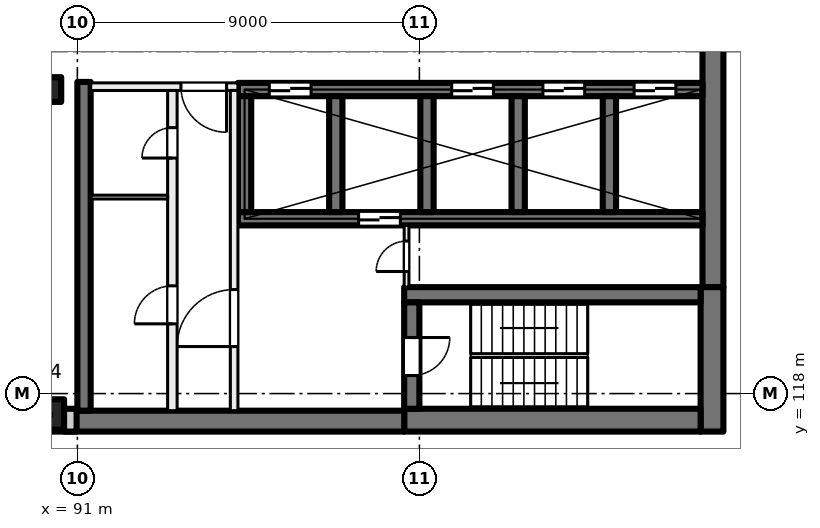
"""IFC4 building model, lengths in metres.
Left out: names, types, materials, properties, quantities, classifications, styles, units other than length and angle.
Written with IfcOpenShell. Run it as: python <this file> out.ifc"""

import sys

from ifc_helpers import new_model, si_unit, direction, frame, frame_2d, origin, origin_2d, place, context, subcontext, project, spatial, rectangle, extrude, element, fill, save


model = new_model("IFC4")
c1 = context("Model", 3, precision=1e-05, world=origin(), true_north=direction((0.0, 1.0)))
c2 = subcontext(c1, "Body", "Model", "MODEL_VIEW")
j1 = project(units=[si_unit("LENGTHUNIT", "METRE"), si_unit("PLANEANGLEUNIT", "RADIAN")], contexts=[c1])
p1 = place(None, origin())
s1 = spatial("IfcSite", under=j1, at=p1, CompositionType="ELEMENT")
p2 = place(p1, origin())
s2 = spatial("IfcBuilding", under=s1, at=p2, CompositionType="ELEMENT")
p3 = place(p2, frame((0.0, 0.0, 146.5)))
s3 = spatial("IfcBuildingStorey", under=s2, at=p3, CompositionType="ELEMENT", Elevation=146.5)
p4 = place(p3, frame((90.25, 126.0, 0.0), z_axis=(0.0, 0.0, 1.0), x_axis=(1.0, 0.0, 0.0)))
e1 = element("IfcColumn", 1, at=p4, inside=s3, PredefinedType="COLUMN", context=c2, shape_type="SweptSolid", body=[
    extrude(rectangle(XDim=0.65, YDim=0.65, at=origin_2d()), origin(), (0.0, 0.0, 1.0), 4.0),
])
p5 = place(p3, frame((90.25, 117.45, 0.0), z_axis=(0.0, 0.0, 1.0), x_axis=(1.0, 0.0, 0.0)))
e2 = element("IfcColumn", 2, at=p5, inside=s3, PredefinedType="COLUMN", context=c2, shape_type="SweptSolid", body=[
    extrude(rectangle(XDim=0.8, YDim=0.8, at=origin_2d()), origin(), (0.0, 0.0, 1.0), 4.0),
])
p6 = place(p3, frame((107.725, 135.2, 0.0), z_axis=(0.0, 0.0, 1.0), x_axis=(0.0, -1.0, 0.0)))
e3 = element("IfcWall", 3, at=p6, inside=s3, PredefinedType="SHEAR", context=c2, shape_type="SweptSolid", body=[
    extrude(rectangle(XDim=14.4, YDim=0.55, at=frame_2d((7.2, 0.0))), origin(), (0.0, 0.0, 1.0), 4.0),
])
p7 = place(p3, frame((107.7, 120.8, 0.0), z_axis=(0.0, 0.0, 1.0), x_axis=(0.0, -1.0, 0.0)))
e4 = element("IfcWall", 4, at=p7, inside=s3, PredefinedType="SHEAR", context=c2, shape_type="SweptSolid", body=[
    extrude(rectangle(XDim=3.8, YDim=0.6, at=frame_2d((1.9, 0.0))), origin(), (0.0, 0.0, 1.0), 4.0),
])
p8 = place(p3, frame((107.4, 117.3, 0.0), z_axis=(0.0, 0.0, 1.0), x_axis=(-1.0, 0.0, 0.0)))
e5 = element("IfcWall", 5, at=p8, inside=s3, PredefinedType="SHEAR", context=c2, shape_type="SweptSolid", body=[
    extrude(rectangle(XDim=7.8, YDim=0.6, at=frame_2d((3.9, 0.0))), origin(), (0.0, 0.0, 1.0), 4.0),
])
p9 = place(p3, frame((99.6, 117.275, 0.0), z_axis=(0.0, 0.0, 1.0), x_axis=(-1.0, 0.0, 0.0)))
e6 = element("IfcWall", 6, at=p9, inside=s3, PredefinedType="SHEAR", context=c2, shape_type="SweptSolid", body=[
    extrude(rectangle(XDim=8.95, YDim=0.55, at=frame_2d((4.475, 0.0))), origin(), (0.0, 0.0, 1.0), 4.0),
])
p10 = place(p3, frame((107.4, 120.6, 0.0), z_axis=(0.0, 0.0, 1.0), x_axis=(-1.0, 0.0, 0.0)))
e7 = element("IfcWall", 7, at=p10, inside=s3, PredefinedType="SHEAR", context=c2, shape_type="SweptSolid", body=[
    extrude(rectangle(XDim=7.8, YDim=0.4, at=frame_2d((3.9, 0.0))), origin(), (0.0, 0.0, 1.0), 4.0),
])
p11 = place(p3, frame((99.8, 120.4, 0.0), z_axis=(0.0, 0.0, 1.0), x_axis=(0.0, -1.0, 0.0)))
e8 = element("IfcWall", 8, at=p11, inside=s3, PredefinedType="SHEAR", context=c2, shape_type="SweptSolid", body=[
    extrude(rectangle(XDim=2.8, YDim=0.4, at=frame_2d((1.4, 0.0))), origin(), (0.0, 0.0, 1.0), 4.0),
])
p12 = place(p11, frame((0.925, 0.0, 0.0)))
e9 = element("IfcOpeningElement", 9, at=p12, cuts=e8, PredefinedType="OPENING", context=c2, shape_type="SweptSolid", body=[
    extrude(rectangle(XDim=1.0, YDim=2.1, at=frame_2d((0.5, 1.05))), frame((0.0, 0.21, 0.0), z_axis=(0.0, -1.0, 0.0), x_axis=(1.0, 0.0, 0.0)), (0.0, 0.0, 1.0), 0.42),
])
p13 = place(p3, frame((107.45, 126.0, 0.0), z_axis=(0.0, 0.0, 1.0), x_axis=(-1.0, 0.0, 0.0)))
e10 = element("IfcWall", 10, at=p13, inside=s3, PredefinedType="SHEAR", context=c2, shape_type="SweptSolid", body=[
    extrude(rectangle(XDim=12.225, YDim=0.35, at=frame_2d((6.112, 0.0))), origin(), (0.0, 0.0, 1.0), 4.0),
])
p14 = place(p13, frame((0.7, 0.0, 0.0)))
e11 = element("IfcOpeningElement", 11, at=p14, cuts=e10, PredefinedType="OPENING", context=c2, shape_type="SweptSolid", body=[
    extrude(rectangle(XDim=1.1, YDim=2.1, at=frame_2d((0.55, 1.05))), frame((0.0, 0.185, 0.0), z_axis=(0.0, -1.0, 0.0), x_axis=(1.0, 0.0, 0.0)), (0.0, 0.0, 1.0), 0.37),
])
p15 = place(p13, frame((3.1, 0.0, 0.0)))
e12 = element("IfcOpeningElement", 12, at=p15, cuts=e10, PredefinedType="OPENING", context=c2, shape_type="SweptSolid", body=[
    extrude(rectangle(XDim=1.1, YDim=2.1, at=frame_2d((0.55, 1.05))), frame((0.0, 0.185, 0.0), z_axis=(0.0, -1.0, 0.0), x_axis=(1.0, 0.0, 0.0)), (0.0, 0.0, 1.0), 0.37),
])
p16 = place(p13, frame((5.5, 0.0, 0.0)))
e13 = element("IfcOpeningElement", 13, at=p16, cuts=e10, PredefinedType="OPENING", context=c2, shape_type="SweptSolid", body=[
    extrude(rectangle(XDim=1.1, YDim=2.1, at=frame_2d((0.55, 1.05))), frame((0.0, 0.185, 0.0), z_axis=(0.0, -1.0, 0.0), x_axis=(1.0, 0.0, 0.0)), (0.0, 0.0, 1.0), 0.37),
])
p17 = place(p13, frame((10.3, 0.0, 0.0)))
e14 = element("IfcOpeningElement", 14, at=p17, cuts=e10, PredefinedType="OPENING", context=c2, shape_type="SweptSolid", body=[
    extrude(rectangle(XDim=1.1, YDim=2.1, at=frame_2d((0.55, 1.05))), frame((0.0, 0.185, 0.0), z_axis=(0.0, -1.0, 0.0), x_axis=(1.0, 0.0, 0.0)), (0.0, 0.0, 1.0), 0.37),
])
p18 = place(p3, frame((107.45, 122.6, 0.0), z_axis=(0.0, 0.0, 1.0), x_axis=(-1.0, 0.0, 0.0)))
e15 = element("IfcWall", 15, at=p18, inside=s3, PredefinedType="SHEAR", context=c2, shape_type="SweptSolid", body=[
    extrude(rectangle(XDim=12.225, YDim=0.35, at=frame_2d((6.112, 0.0))), origin(), (0.0, 0.0, 1.0), 4.0),
])
p19 = place(p18, frame((7.95, 0.0, 0.0)))
e16 = element("IfcOpeningElement", 16, at=p19, cuts=e15, PredefinedType="OPENING", context=c2, shape_type="SweptSolid", body=[
    extrude(rectangle(XDim=1.1, YDim=2.1, at=frame_2d((0.55, 1.05))), frame((0.0, 0.185, 0.0), z_axis=(0.0, -1.0, 0.0), x_axis=(1.0, 0.0, 0.0)), (0.0, 0.0, 1.0), 0.37),
])
for number, where, z_axis, x_axis in (
    (17, (105.0, 125.825, 0.0), (0.0, 0.0, 1.0), (0.0, -1.0, 0.0)),
    (18, (102.6, 125.825, 0.0), (0.0, 0.0, 1.0), (0.0, -1.0, 0.0)),
    (19, (100.2, 125.825, 0.0), (0.0, 0.0, 1.0), (0.0, -1.0, 0.0)),
    (20, (97.8, 125.825, 0.0), (0.0, 0.0, 1.0), (0.0, -1.0, 0.0)),
    (21, (95.4, 125.825, 0.0), (0.0, 0.0, 1.0), (0.0, -1.0, 0.0)),
):
    element("IfcWall", number, at=place(p3, frame(where, z_axis=z_axis, x_axis=x_axis)), inside=s3, PredefinedType="SHEAR", context=c2, shape_type="SweptSolid", body=[
        extrude(rectangle(XDim=3.05, YDim=0.35, at=frame_2d((1.525, 0.0))), origin(), (0.0, 0.0, 1.0), 4.0),
    ])
p20 = place(p3, frame((91.175, 126.2, 0.0), z_axis=(0.0, 0.0, 1.0), x_axis=(0.0, -1.0, 0.0)))
e22 = element("IfcWall", 22, at=p20, inside=s3, PredefinedType="SHEAR", context=c2, shape_type="SweptSolid", body=[
    extrude(rectangle(XDim=8.65, YDim=0.35, at=frame_2d((4.325, 0.0))), origin(), (0.0, 0.0, 1.0), 4.0),
])
p21 = place(p3, frame((90.98, 117.3, 0.0), z_axis=(0.0, 0.0, 1.0), x_axis=(-1.0, 0.0, 0.0)))
e23 = element("IfcWall", 23, at=p21, inside=s3, PredefinedType="SOLIDWALL", context=c2, shape_type="SweptSolid", body=[
    extrude(rectangle(XDim=33.745, YDim=0.6, at=frame_2d((16.873, 0.0))), origin(), (0.0, 0.0, 1.0), 3.625),
])
p22 = place(p21, frame((1.48, 0.0, 0.9)))
e24 = element("IfcOpeningElement", 24, at=p22, cuts=e23, PredefinedType="OPENING", context=c2, shape_type="SweptSolid", body=[
    extrude(rectangle(XDim=3.0, YDim=2.4, at=frame_2d((1.5, 1.2))), frame((0.0, 0.31, 0.0), z_axis=(0.0, -1.0, 0.0), x_axis=(1.0, 0.0, 0.0)), (0.0, 0.0, 1.0), 0.62),
])
p23 = place(p21, frame((5.98, 0.0, 0.9)))
e25 = element("IfcOpeningElement", 25, at=p23, cuts=e23, PredefinedType="OPENING", context=c2, shape_type="SweptSolid", body=[
    extrude(rectangle(XDim=3.0, YDim=2.4, at=frame_2d((1.5, 1.2))), frame((0.0, 0.31, 0.0), z_axis=(0.0, -1.0, 0.0), x_axis=(1.0, 0.0, 0.0)), (0.0, 0.0, 1.0), 0.62),
])
p24 = place(p21, frame((10.48, 0.0, 0.9)))
e26 = element("IfcOpeningElement", 26, at=p24, cuts=e23, PredefinedType="OPENING", context=c2, shape_type="SweptSolid", body=[
    extrude(rectangle(XDim=3.0, YDim=2.4, at=frame_2d((1.5, 1.2))), frame((0.0, 0.31, 0.0), z_axis=(0.0, -1.0, 0.0), x_axis=(1.0, 0.0, 0.0)), (0.0, 0.0, 1.0), 0.62),
])
p25 = place(p21, frame((14.98, 0.0, 0.9)))
e27 = element("IfcOpeningElement", 27, at=p25, cuts=e23, PredefinedType="OPENING", context=c2, shape_type="SweptSolid", body=[
    extrude(rectangle(XDim=3.0, YDim=2.4, at=frame_2d((1.5, 1.2))), frame((0.0, 0.31, 0.0), z_axis=(0.0, -1.0, 0.0), x_axis=(1.0, 0.0, 0.0)), (0.0, 0.0, 1.0), 0.62),
])
p26 = place(p21, frame((19.48, 0.0, 0.9)))
e28 = element("IfcOpeningElement", 28, at=p26, cuts=e23, PredefinedType="OPENING", context=c2, shape_type="SweptSolid", body=[
    extrude(rectangle(XDim=3.0, YDim=2.4, at=frame_2d((1.5, 1.2))), frame((0.0, 0.31, 0.0), z_axis=(0.0, -1.0, 0.0), x_axis=(1.0, 0.0, 0.0)), (0.0, 0.0, 1.0), 0.62),
])
p27 = place(p21, frame((23.98, 0.0, 0.9)))
e29 = element("IfcOpeningElement", 29, at=p27, cuts=e23, PredefinedType="OPENING", context=c2, shape_type="SweptSolid", body=[
    extrude(rectangle(XDim=3.0, YDim=2.4, at=frame_2d((1.5, 1.2))), frame((0.0, 0.31, 0.0), z_axis=(0.0, -1.0, 0.0), x_axis=(1.0, 0.0, 0.0)), (0.0, 0.0, 1.0), 0.62),
])
p28 = place(p21, frame((28.48, 0.0, 0.9)))
e30 = element("IfcOpeningElement", 30, at=p28, cuts=e23, PredefinedType="OPENING", context=c2, shape_type="SweptSolid", body=[
    extrude(rectangle(XDim=3.0, YDim=2.4, at=frame_2d((1.5, 1.2))), frame((0.0, 0.31, 0.0), z_axis=(0.0, -1.0, 0.0), x_axis=(1.0, 0.0, 0.0)), (0.0, 0.0, 1.0), 0.62),
])
p29 = place(p3, frame((95.225, 126.075, 0.0), z_axis=(0.0, 0.0, 1.0), x_axis=(-1.0, 0.0, 0.0)))
e31 = element("IfcWall", 31, at=p29, inside=s3, PredefinedType="PARTITIONING", context=c2, shape_type="SweptSolid", body=[
    extrude(rectangle(XDim=3.875, YDim=0.2, at=frame_2d((1.938, 0.0))), origin(), (0.0, 0.0, 1.0), 3.625),
])
p30 = place(p29, frame((0.3, 0.0, 0.0)))
e32 = element("IfcOpeningElement", 32, at=p30, cuts=e31, PredefinedType="OPENING", context=c2, shape_type="SweptSolid", body=[
    extrude(rectangle(XDim=1.2, YDim=2.1, at=frame_2d((0.6, 1.05))), frame((0.0, 0.11, 0.0), z_axis=(0.0, -1.0, 0.0), x_axis=(1.0, 0.0, 0.0)), (0.0, 0.0, 1.0), 0.22),
])
p31 = place(p3, frame((95.125, 117.55, 0.0), z_axis=(0.0, 0.0, 1.0), x_axis=(0.0, 1.0, 0.0)))
e33 = element("IfcWall", 33, at=p31, inside=s3, PredefinedType="PARTITIONING", context=c2, shape_type="SweptSolid", body=[
    extrude(rectangle(XDim=8.425, YDim=0.2, at=frame_2d((4.212, 0.0))), origin(), (0.0, 0.0, 1.0), 3.625),
])
p32 = place(p31, frame((1.688, 0.0, 0.0)))
e34 = element("IfcOpeningElement", 34, at=p32, cuts=e33, PredefinedType="OPENING", context=c2, shape_type="SweptSolid", body=[
    extrude(rectangle(XDim=1.5, YDim=2.1, at=frame_2d((0.75, 1.05))), frame((0.0, 0.11, 0.0), z_axis=(0.0, -1.0, 0.0), x_axis=(1.0, 0.0, 0.0)), (0.0, 0.0, 1.0), 0.22),
])
p33 = place(p3, frame((93.5, 117.55, 0.0), z_axis=(0.0, 0.0, 1.0), x_axis=(0.0, 1.0, 0.0)))
e35 = element("IfcWall", 35, at=p33, inside=s3, PredefinedType="PARTITIONING", context=c2, shape_type="SweptSolid", body=[
    extrude(rectangle(XDim=8.425, YDim=0.25, at=frame_2d((4.212, 0.0))), origin(), (0.0, 0.0, 1.0), 3.625),
])
p34 = place(p33, frame((6.647, 0.0, 0.0)))
e36 = element("IfcOpeningElement", 36, at=p34, cuts=e35, PredefinedType="OPENING", context=c2, shape_type="SweptSolid", body=[
    extrude(rectangle(XDim=0.8, YDim=2.1, at=frame_2d((0.4, 1.05))), frame((0.0, 0.135, 0.0), z_axis=(0.0, -1.0, 0.0), x_axis=(1.0, 0.0, 0.0)), (0.0, 0.0, 1.0), 0.27),
])
p35 = place(p33, frame((2.285, 0.0, 0.0)))
e37 = element("IfcOpeningElement", 37, at=p35, cuts=e35, PredefinedType="OPENING", context=c2, shape_type="SweptSolid", body=[
    extrude(rectangle(XDim=1.0, YDim=2.1, at=frame_2d((0.5, 1.05))), frame((0.0, 0.135, 0.0), z_axis=(0.0, -1.0, 0.0), x_axis=(1.0, 0.0, 0.0)), (0.0, 0.0, 1.0), 0.27),
])
p36 = place(p3, frame((99.663, 120.8, 0.0), z_axis=(0.0, 0.0, 1.0), x_axis=(0.0, 1.0, 0.0)))
e38 = element("IfcWall", 38, at=p36, inside=s3, PredefinedType="PARTITIONING", context=c2, shape_type="SweptSolid", body=[
    extrude(rectangle(XDim=1.625, YDim=0.125, at=frame_2d((0.812, 0.0))), origin(), (0.0, 0.0, 1.0), 3.625),
])
p37 = place(p36, frame((0.413, 0.0, 0.0)))
e39 = element("IfcOpeningElement", 39, at=p37, cuts=e38, PredefinedType="OPENING", context=c2, shape_type="SweptSolid", body=[
    extrude(rectangle(XDim=0.8, YDim=2.1, at=frame_2d((0.4, 1.05))), frame((0.0, 0.073, 0.0), z_axis=(0.0, -1.0, 0.0), x_axis=(1.0, 0.0, 0.0)), (0.0, 0.0, 1.0), 0.145),
])
p38 = place(p3, frame((93.375, 123.17, 0.0), z_axis=(0.0, 0.0, 1.0), x_axis=(-1.0, 0.0, 0.0)))
e40 = element("IfcWall", 40, at=p38, inside=s3, PredefinedType="PARTITIONING", context=c2, shape_type="SweptSolid", body=[
    extrude(rectangle(XDim=2.025, YDim=0.1, at=frame_2d((1.012, 0.0))), origin(), (0.0, 0.0, 1.0), 3.625),
])
p39 = place(p14, origin())
e41 = element("IfcDoor", 41, at=p39, inside=s3, OperationType="DOUBLE_DOOR_SLIDING", PredefinedType="DOOR", context=c2, shape_type="SweptSolid", body=[
    extrude(rectangle(XDim=1.1, YDim=2.1, at=frame_2d((0.55, 1.05))), frame((0.0, 0.025, 0.0), z_axis=(0.0, -1.0, 0.0), x_axis=(1.0, 0.0, 0.0)), (0.0, 0.0, 1.0), 0.05),
])
fill(e11, e41)
p40 = place(p15, origin())
e42 = element("IfcDoor", 42, at=p40, inside=s3, OperationType="DOUBLE_DOOR_SLIDING", PredefinedType="DOOR", context=c2, shape_type="SweptSolid", body=[
    extrude(rectangle(XDim=1.1, YDim=2.1, at=frame_2d((0.55, 1.05))), frame((0.0, 0.025, 0.0), z_axis=(0.0, -1.0, 0.0), x_axis=(1.0, 0.0, 0.0)), (0.0, 0.0, 1.0), 0.05),
])
fill(e12, e42)
p41 = place(p16, origin())
e43 = element("IfcDoor", 43, at=p41, inside=s3, OperationType="DOUBLE_DOOR_SLIDING", PredefinedType="DOOR", context=c2, shape_type="SweptSolid", body=[
    extrude(rectangle(XDim=1.1, YDim=2.1, at=frame_2d((0.55, 1.05))), frame((0.0, 0.025, 0.0), z_axis=(0.0, -1.0, 0.0), x_axis=(1.0, 0.0, 0.0)), (0.0, 0.0, 1.0), 0.05),
])
fill(e13, e43)
p42 = place(p17, origin())
e44 = element("IfcDoor", 44, at=p42, inside=s3, OperationType="DOUBLE_DOOR_SLIDING", PredefinedType="DOOR", context=c2, shape_type="SweptSolid", body=[
    extrude(rectangle(XDim=1.1, YDim=2.1, at=frame_2d((0.55, 1.05))), frame((0.0, 0.025, 0.0), z_axis=(0.0, -1.0, 0.0), x_axis=(1.0, 0.0, 0.0)), (0.0, 0.0, 1.0), 0.05),
])
fill(e14, e44)
p43 = place(p30, origin())
e45 = element("IfcDoor", 45, at=p43, inside=s3, OperationType="DOUBLE_DOOR_SINGLE_SWING", PredefinedType="DOOR", context=c2, shape_type="SweptSolid", body=[
    extrude(rectangle(XDim=1.2, YDim=2.1, at=frame_2d((0.6, 1.05))), frame((0.0, 0.025, 0.0), z_axis=(0.0, -1.0, 0.0), x_axis=(1.0, 0.0, 0.0)), (0.0, 0.0, 1.0), 0.05),
])
fill(e32, e45)
p44 = place(p32, origin())
e46 = element("IfcDoor", 46, at=p44, inside=s3, OperationType="DOUBLE_DOOR_SINGLE_SWING", PredefinedType="DOOR", context=c2, shape_type="SweptSolid", body=[
    extrude(rectangle(XDim=1.5, YDim=2.1, at=frame_2d((0.75, 1.05))), frame((0.0, 0.025, 0.0), z_axis=(0.0, -1.0, 0.0), x_axis=(1.0, 0.0, 0.0)), (0.0, 0.0, 1.0), 0.05),
])
fill(e34, e46)
p45 = place(p12, origin())
e47 = element("IfcDoor", 47, at=p45, inside=s3, OperationType="SINGLE_SWING_LEFT", PredefinedType="DOOR", context=c2, shape_type="SweptSolid", body=[
    extrude(rectangle(XDim=1.0, YDim=2.1, at=frame_2d((0.5, 1.05))), frame((0.0, 0.025, 0.0), z_axis=(0.0, -1.0, 0.0), x_axis=(1.0, 0.0, 0.0)), (0.0, 0.0, 1.0), 0.05),
])
fill(e9, e47)
p46 = place(p37, origin())
e48 = element("IfcDoor", 48, at=p46, inside=s3, OperationType="SINGLE_SWING_RIGHT", PredefinedType="DOOR", context=c2, shape_type="SweptSolid", body=[
    extrude(rectangle(XDim=0.8, YDim=2.1, at=frame_2d((0.4, 1.05))), frame((0.0, 0.025, 0.0), z_axis=(0.0, -1.0, 0.0), x_axis=(1.0, 0.0, 0.0)), (0.0, 0.0, 1.0), 0.05),
])
fill(e39, e48)
p47 = place(p34, origin())
e49 = element("IfcDoor", 49, at=p47, inside=s3, OperationType="SINGLE_SWING_LEFT", PredefinedType="DOOR", context=c2, shape_type="SweptSolid", body=[
    extrude(rectangle(XDim=0.8, YDim=2.1, at=frame_2d((0.4, 1.05))), frame((0.0, 0.025, 0.0), z_axis=(0.0, -1.0, 0.0), x_axis=(1.0, 0.0, 0.0)), (0.0, 0.0, 1.0), 0.05),
])
fill(e36, e49)
p48 = place(p35, origin())
e50 = element("IfcDoor", 50, at=p48, inside=s3, OperationType="SINGLE_SWING_RIGHT", PredefinedType="DOOR", context=c2, shape_type="SweptSolid", body=[
    extrude(rectangle(XDim=1.0, YDim=2.1, at=frame_2d((0.5, 1.05))), frame((0.0, 0.025, 0.0), z_axis=(0.0, -1.0, 0.0), x_axis=(1.0, 0.0, 0.0)), (0.0, 0.0, 1.0), 0.05),
])
fill(e37, e50)
p49 = place(p19, origin())
e51 = element("IfcDoor", 51, at=p49, inside=s3, OperationType="DOUBLE_DOOR_SLIDING", PredefinedType="DOOR", context=c2, shape_type="SweptSolid", body=[
    extrude(rectangle(XDim=1.1, YDim=2.1, at=frame_2d((0.55, 1.05))), frame((0.0, 0.025, 0.0), z_axis=(0.0, -1.0, 0.0), x_axis=(1.0, 0.0, 0.0)), (0.0, 0.0, 1.0), 0.05),
])
fill(e16, e51)
save(model, sys.argv[1])
